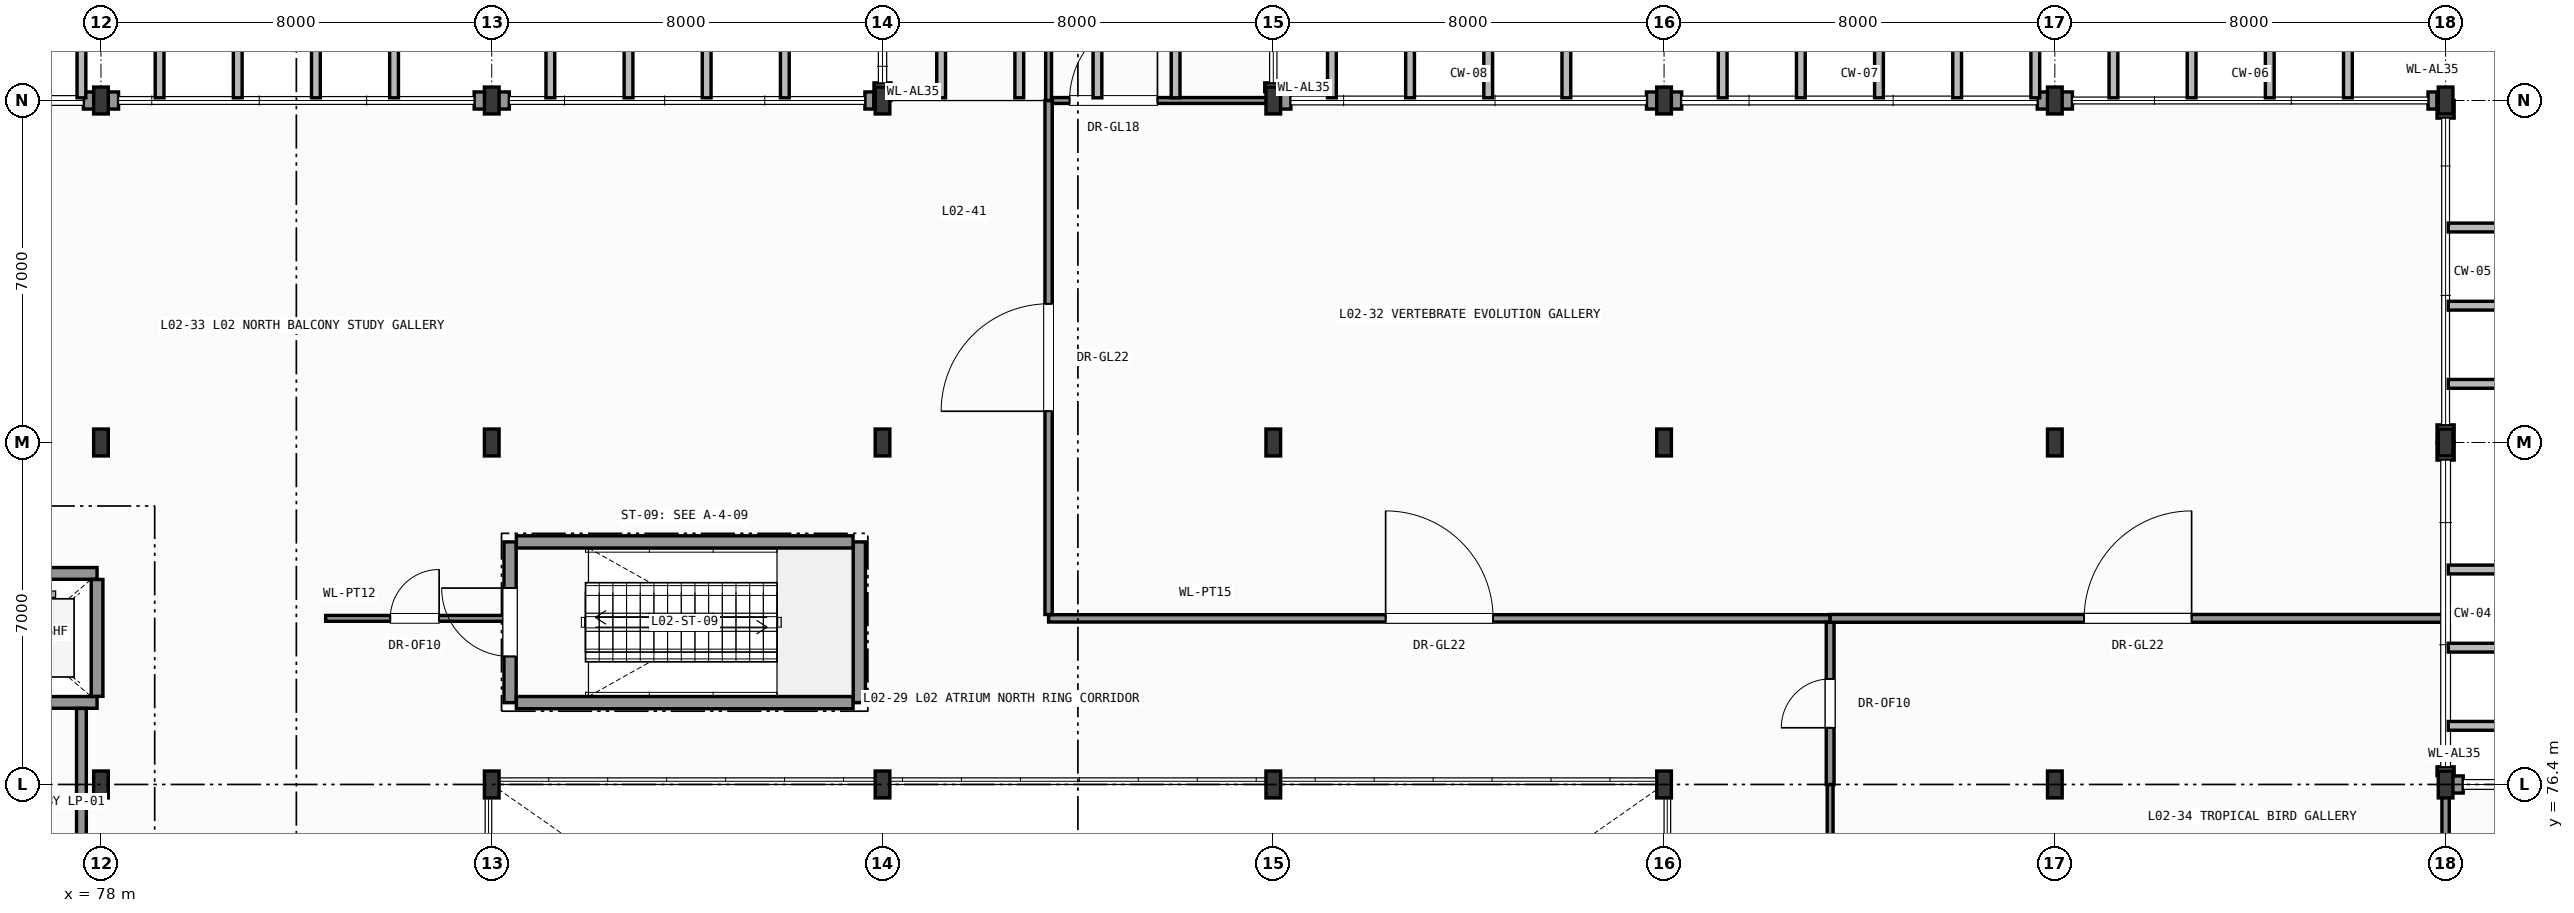
"""IFC4 building model, lengths in metres.
Left out: names, types, materials, properties, quantities, classifications, styles, units other than length and angle.
Written with IfcOpenShell. Run it as: python <this file> out.ifc"""

import sys

from ifc_helpers import new_model, si_unit, direction, frame, frame_2d, origin, origin_2d, place, context, subcontext, project, spatial, rectangle, i_section, extrude, element, fill, save


model = new_model("IFC4")
c1 = context("Model", 3, precision=1e-05, world=origin(), true_north=direction((0.0, 1.0)))
c2 = subcontext(c1, "Body", "Model", "MODEL_VIEW")
j1 = project(units=[si_unit("LENGTHUNIT", "METRE"), si_unit("PLANEANGLEUNIT", "RADIAN")], contexts=[c1])
p1 = place(None, origin())
s1 = spatial("IfcSite", under=j1, at=p1, CompositionType="ELEMENT")
p2 = place(p1, origin())
s2 = spatial("IfcBuilding", under=s1, at=p2, CompositionType="ELEMENT")
p3 = place(p2, frame((0.0, 0.0, 7.8)))
s3 = spatial("IfcBuildingStorey", under=s2, at=p3, CompositionType="ELEMENT", Elevation=7.8)
for number, where, z_axis, x_axis in (
    (1, (78.0, 76.4, 0.0), (0.0, 0.0, 1.0), (1.0, 0.0, 0.0)),
    (2, (78.0, 83.4, 0.0), (0.0, 0.0, 1.0), (1.0, 0.0, 0.0)),
    (3, (78.0, 90.4, 0.0), (0.0, 0.0, 1.0), (1.0, 0.0, 0.0)),
    (4, (86.0, 76.4, 0.0), (0.0, 0.0, 1.0), (1.0, 0.0, 0.0)),
    (5, (86.0, 83.4, 0.0), (0.0, 0.0, 1.0), (1.0, 0.0, 0.0)),
    (6, (86.0, 90.4, 0.0), (0.0, 0.0, 1.0), (1.0, 0.0, 0.0)),
    (7, (94.0, 76.4, 0.0), (0.0, 0.0, 1.0), (1.0, 0.0, 0.0)),
    (8, (94.0, 83.4, 0.0), (0.0, 0.0, 1.0), (1.0, 0.0, 0.0)),
    (9, (94.0, 90.4, 0.0), (0.0, 0.0, 1.0), (1.0, 0.0, 0.0)),
    (10, (102.0, 76.4, 0.0), (0.0, 0.0, 1.0), (1.0, 0.0, 0.0)),
    (11, (102.0, 83.4, 0.0), (0.0, 0.0, 1.0), (1.0, 0.0, 0.0)),
    (12, (102.0, 90.4, 0.0), (0.0, 0.0, 1.0), (1.0, 0.0, 0.0)),
    (13, (110.0, 76.4, 0.0), (0.0, 0.0, 1.0), (1.0, 0.0, 0.0)),
    (14, (110.0, 83.4, 0.0), (0.0, 0.0, 1.0), (1.0, 0.0, 0.0)),
    (15, (110.0, 90.4, 0.0), (0.0, 0.0, 1.0), (1.0, 0.0, 0.0)),
    (16, (118.0, 76.4, 0.0), (0.0, 0.0, 1.0), (1.0, 0.0, 0.0)),
    (17, (118.0, 83.4, 0.0), (0.0, 0.0, 1.0), (1.0, 0.0, 0.0)),
    (18, (118.0, 90.4, 0.0), (0.0, 0.0, 1.0), (1.0, 0.0, 0.0)),
    (19, (126.0, 76.4, 0.0), (0.0, 0.0, 1.0), (1.0, 0.0, 0.0)),
    (20, (126.0, 83.4, 0.0), (0.0, 0.0, 1.0), (1.0, 0.0, 0.0)),
    (21, (126.0, 90.4, 0.0), (0.0, 0.0, 1.0), (1.0, 0.0, 0.0)),
):
    element("IfcColumn", number, at=place(p3, frame(where, z_axis=z_axis, x_axis=x_axis)), inside=s3, PredefinedType="COLUMN", context=c2, shape_type="SweptSolid", body=[
        extrude(i_section(OverallWidth=0.3, OverallDepth=0.55, WebThickness=0.015, FlangeThickness=0.029, FilletRadius=0.027, at=origin_2d()), origin(), (0.0, 0.0, 1.0), 5.4),
    ])
p4 = place(p3, frame((126.36, 76.4, 0.0), z_axis=(0.0, 0.0, 1.0), x_axis=(-1.0, 0.0, 0.0)))
e22 = element("IfcWall", 22, at=p4, inside=s3, PredefinedType="SOLIDWALL", context=c2, shape_type="SweptSolid", body=[
    extrude(rectangle(XDim=0.36, YDim=0.35, at=frame_2d((0.18, 0.0))), origin(), (0.0, 0.0, 1.0), 4.745),
])
p5 = place(p3, frame((126.0, 76.579, 0.0), z_axis=(0.0, 0.0, 1.0), x_axis=(0.0, 1.0, 0.0)))
e23 = element("IfcWall", 23, at=p5, inside=s3, PredefinedType="SOLIDWALL", context=c2, shape_type="SweptSolid", body=[
    extrude(rectangle(XDim=0.181, YDim=0.35, at=frame_2d((0.09, 0.0))), origin(), (0.0, 0.0, 1.0), 5.15),
])
p6 = place(p3, frame((126.0, 83.04, 0.0), z_axis=(0.0, 0.0, 1.0), x_axis=(0.0, 1.0, 0.0)))
e24 = element("IfcWall", 24, at=p6, inside=s3, PredefinedType="SOLIDWALL", context=c2, shape_type="SweptSolid", body=[
    extrude(rectangle(XDim=0.36, YDim=0.35, at=frame_2d((0.18, 0.0))), origin(), (0.0, 0.0, 1.0), 4.845),
])
p7 = place(p3, frame((126.0, 83.4, 0.0), z_axis=(0.0, 0.0, 1.0), x_axis=(0.0, 1.0, 0.0)))
e25 = element("IfcWall", 25, at=p7, inside=s3, PredefinedType="SOLIDWALL", context=c2, shape_type="SweptSolid", body=[
    extrude(rectangle(XDim=0.36, YDim=0.35, at=frame_2d((0.18, 0.0))), origin(), (0.0, 0.0, 1.0), 4.845),
])
p8 = place(p3, frame((126.0, 90.04, 0.0), z_axis=(0.0, 0.0, 1.0), x_axis=(0.0, 1.0, 0.0)))
e26 = element("IfcWall", 26, at=p8, inside=s3, PredefinedType="SOLIDWALL", context=c2, shape_type="SweptSolid", body=[
    extrude(rectangle(XDim=0.36, YDim=0.35, at=frame_2d((0.18, 0.0))), origin(), (0.0, 0.0, 1.0), 4.845),
])
p9 = place(p3, frame((125.821, 90.4, 0.0), z_axis=(0.0, 0.0, 1.0), x_axis=(-1.0, 0.0, 0.0)))
e27 = element("IfcWall", 27, at=p9, inside=s3, PredefinedType="SOLIDWALL", context=c2, shape_type="SweptSolid", body=[
    extrude(rectangle(XDim=0.181, YDim=0.35, at=frame_2d((0.091, 0.0))), origin(), (0.0, 0.0, 1.0), 5.15),
])
for number, where, z_axis, x_axis in (
    (28, (118.36, 90.4, 0.0), (0.0, 0.0, 1.0), (-1.0, 0.0, 0.0)),
    (29, (118.0, 90.4, 0.0), (0.0, 0.0, 1.0), (-1.0, 0.0, 0.0)),
    (30, (110.36, 90.4, 0.0), (0.0, 0.0, 1.0), (-1.0, 0.0, 0.0)),
    (31, (110.0, 90.4, 0.0), (0.0, 0.0, 1.0), (-1.0, 0.0, 0.0)),
    (32, (102.36, 90.4, 0.0), (0.0, 0.0, 1.0), (-1.0, 0.0, 0.0)),
):
    element("IfcWall", number, at=place(p3, frame(where, z_axis=z_axis, x_axis=x_axis)), inside=s3, PredefinedType="SOLIDWALL", context=c2, shape_type="SweptSolid", body=[
        extrude(rectangle(XDim=0.36, YDim=0.35, at=frame_2d((0.18, 0.0))), origin(), (0.0, 0.0, 1.0), 4.745),
    ])
p10 = place(p3, frame((102.0, 90.579, 0.0), z_axis=(0.0, 0.0, 1.0), x_axis=(0.0, 1.0, 0.0)))
e33 = element("IfcWall", 33, at=p10, inside=s3, PredefinedType="SOLIDWALL", context=c2, shape_type="SweptSolid", body=[
    extrude(rectangle(XDim=0.181, YDim=0.35, at=frame_2d((0.09, 0.0))), origin(), (0.0, 0.0, 1.0), 5.15),
])
p11 = place(p3, frame((94.0, 90.76, 0.0), z_axis=(0.0, 0.0, 1.0), x_axis=(0.0, -1.0, 0.0)))
e34 = element("IfcWall", 34, at=p11, inside=s3, PredefinedType="SOLIDWALL", context=c2, shape_type="SweptSolid", body=[
    extrude(rectangle(XDim=0.36, YDim=0.35, at=frame_2d((0.18, 0.0))), origin(), (0.0, 0.0, 1.0), 4.635),
])
p12 = place(p3, frame((93.821, 90.4, 0.0), z_axis=(0.0, 0.0, 1.0), x_axis=(-1.0, 0.0, 0.0)))
e35 = element("IfcWall", 35, at=p12, inside=s3, PredefinedType="SOLIDWALL", context=c2, shape_type="SweptSolid", body=[
    extrude(rectangle(XDim=0.181, YDim=0.35, at=frame_2d((0.091, 0.0))), origin(), (0.0, 0.0, 1.0), 5.15),
])
for number, where, z_axis, x_axis in (
    (36, (86.36, 90.4, 0.0), (0.0, 0.0, 1.0), (-1.0, 0.0, 0.0)),
    (37, (86.0, 90.4, 0.0), (0.0, 0.0, 1.0), (-1.0, 0.0, 0.0)),
    (38, (78.36, 90.4, 0.0), (0.0, 0.0, 1.0), (-1.0, 0.0, 0.0)),
    (39, (78.0, 90.4, 0.0), (0.0, 0.0, 1.0), (-1.0, 0.0, 0.0)),
):
    element("IfcWall", number, at=place(p3, frame(where, z_axis=z_axis, x_axis=x_axis)), inside=s3, PredefinedType="SOLIDWALL", context=c2, shape_type="SweptSolid", body=[
        extrude(rectangle(XDim=0.36, YDim=0.35, at=frame_2d((0.18, 0.0))), origin(), (0.0, 0.0, 1.0), 4.745),
    ])
p13 = place(p3, frame((86.375, 78.075, 0.0), z_axis=(0.0, 0.0, 1.0), x_axis=(0.0, 1.0, 0.0)))
e40 = element("IfcWall", 40, at=p13, inside=s3, PredefinedType="SHEAR", context=c2, shape_type="SweptSolid", body=[
    extrude(rectangle(XDim=3.29, YDim=0.25, at=frame_2d((1.645, 0.0))), origin(), (0.0, 0.0, 1.0), 5.15),
])
p14 = place(p13, frame((0.945, 0.0, 0.0)))
e41 = element("IfcOpeningElement", 41, at=p14, cuts=e40, PredefinedType="OPENING", context=c2, shape_type="SweptSolid", body=[
    extrude(rectangle(XDim=1.4, YDim=2.2, at=frame_2d((0.7, 1.1))), frame((0.0, 0.135, 0.0), z_axis=(0.0, -1.0, 0.0), x_axis=(1.0, 0.0, 0.0)), (0.0, 0.0, 1.0), 0.27),
])
p15 = place(p3, frame((93.525, 78.075, 0.0), z_axis=(0.0, 0.0, 1.0), x_axis=(0.0, 1.0, 0.0)))
e42 = element("IfcWall", 42, at=p15, inside=s3, PredefinedType="SHEAR", context=c2, shape_type="SweptSolid", body=[
    extrude(rectangle(XDim=3.29, YDim=0.25, at=frame_2d((1.645, 0.0))), origin(), (0.0, 0.0, 1.0), 5.15),
])
for number, where, z_axis, x_axis in (
    (43, (86.504, 78.075, 0.0), (0.0, 0.0, 1.0), (1.0, 0.0, 0.0)),
    (44, (86.504, 81.365, 0.0), (0.0, 0.0, 1.0), (1.0, 0.0, 0.0)),
):
    element("IfcWall", number, at=place(p3, frame(where, z_axis=z_axis, x_axis=x_axis)), inside=s3, PredefinedType="SHEAR", context=c2, shape_type="SweptSolid", body=[
        extrude(rectangle(XDim=6.892, YDim=0.25, at=frame_2d((3.446, 0.0))), origin(), (0.0, 0.0, 1.0), 5.15),
    ])
p16 = place(p3, frame((74.88, 78.08, 0.0), z_axis=(0.0, 0.0, 1.0), x_axis=(1.0, 0.0, 0.0)))
e45 = element("IfcWall", 45, at=p16, inside=s3, PredefinedType="SHEAR", context=c2, shape_type="SweptSolid", body=[
    extrude(rectangle(XDim=3.04, YDim=0.24, at=frame_2d((1.52, 0.0))), origin(), (0.0, 0.0, 1.0), 5.15),
])
p17 = place(p16, frame((0.97, 0.0, 0.0)))
e46 = element("IfcOpeningElement", 46, at=p17, cuts=e45, PredefinedType="OPENING", context=c2, shape_type="SweptSolid", body=[
    extrude(rectangle(XDim=1.1, YDim=2.2, at=frame_2d((0.55, 1.1))), frame((0.0, 0.13, 0.0), z_axis=(0.0, -1.0, 0.0), x_axis=(1.0, 0.0, 0.0)), (0.0, 0.0, 1.0), 0.26),
])
p18 = place(p3, frame((74.88, 80.72, 0.0), z_axis=(0.0, 0.0, 1.0), x_axis=(1.0, 0.0, 0.0)))
e47 = element("IfcWall", 47, at=p18, inside=s3, PredefinedType="SHEAR", context=c2, shape_type="SweptSolid", body=[
    extrude(rectangle(XDim=3.04, YDim=0.24, at=frame_2d((1.52, 0.0))), origin(), (0.0, 0.0, 1.0), 5.15),
])
p19 = place(p3, frame((77.92, 78.204, 0.0), z_axis=(0.0, 0.0, 1.0), x_axis=(0.0, 1.0, 0.0)))
e48 = element("IfcWall", 48, at=p19, inside=s3, PredefinedType="SHEAR", context=c2, shape_type="SweptSolid", body=[
    extrude(rectangle(XDim=2.392, YDim=0.24, at=frame_2d((1.196, 0.0))), origin(), (0.0, 0.0, 1.0), 5.15),
])
p20 = place(p3, frame((77.6, 74.304, 0.0), z_axis=(0.0, 0.0, 1.0), x_axis=(0.0, 1.0, 0.0)))
e49 = element("IfcWall", 49, at=p20, inside=s3, PredefinedType="PARTITIONING", context=c2, shape_type="SweptSolid", body=[
    extrude(rectangle(XDim=3.652, YDim=0.2, at=frame_2d((1.826, 0.0))), origin(), (0.0, 0.0, 1.0), 5.15),
])
p21 = place(p3, frame((113.4, 71.6, 0.0), z_axis=(0.0, 0.0, 1.0), x_axis=(0.0, 1.0, 0.0)))
e50 = element("IfcWall", 50, at=p21, inside=s3, PredefinedType="PARTITIONING", context=c2, shape_type="SweptSolid", body=[
    extrude(rectangle(XDim=4.8, YDim=0.12, at=frame_2d((2.4, 0.0))), origin(), (0.0, 0.0, 1.0), 5.15),
])
p22 = place(p21, frame((1.5, 0.0, 0.0)))
e51 = element("IfcOpeningElement", 51, at=p22, cuts=e50, PredefinedType="OPENING", context=c2, shape_type="SweptSolid", body=[
    extrude(rectangle(XDim=1.8, YDim=2.4, at=frame_2d((0.9, 1.2))), frame((0.0, 0.07, 0.0), z_axis=(0.0, -1.0, 0.0), x_axis=(1.0, 0.0, 0.0)), (0.0, 0.0, 1.0), 0.14),
])
p23 = place(p3, frame((97.4, 79.8, 0.0), z_axis=(0.0, 0.0, 1.0), x_axis=(1.0, 0.0, 0.0)))
e52 = element("IfcWall", 52, at=p23, inside=s3, PredefinedType="PARTITIONING", context=c2, shape_type="SweptSolid", body=[
    extrude(rectangle(XDim=16.0, YDim=0.15, at=frame_2d((8.0, 0.0))), origin(), (0.0, 0.0, 1.0), 4.775),
])
p24 = place(p23, frame((6.9, 0.0, 0.0)))
e53 = element("IfcOpeningElement", 53, at=p24, cuts=e52, PredefinedType="OPENING", context=c2, shape_type="SweptSolid", body=[
    extrude(rectangle(XDim=2.2, YDim=2.6, at=frame_2d((1.1, 1.3))), frame((0.0, 0.085, 0.0), z_axis=(0.0, -1.0, 0.0), x_axis=(1.0, 0.0, 0.0)), (0.0, 0.0, 1.0), 0.17),
])
p25 = place(p3, frame((82.6, 79.8, 0.0), z_axis=(0.0, 0.0, 1.0), x_axis=(1.0, 0.0, 0.0)))
e54 = element("IfcWall", 54, at=p25, inside=s3, PredefinedType="PARTITIONING", context=c2, shape_type="SweptSolid", body=[
    extrude(rectangle(XDim=3.646, YDim=0.12, at=frame_2d((1.823, 0.0))), origin(), (0.0, 0.0, 1.0), 4.805),
])
p26 = place(p25, frame((1.323, 0.0, 0.0)))
e55 = element("IfcOpeningElement", 55, at=p26, cuts=e54, PredefinedType="OPENING", context=c2, shape_type="SweptSolid", body=[
    extrude(rectangle(XDim=1.0, YDim=2.15, at=frame_2d((0.5, 1.075))), frame((0.0, 0.07, 0.0), z_axis=(0.0, -1.0, 0.0), x_axis=(1.0, 0.0, 0.0)), (0.0, 0.0, 1.0), 0.14),
])
p27 = place(p3, frame((113.4, 76.4, 0.0), z_axis=(0.0, 0.0, 1.0), x_axis=(0.0, 1.0, 0.0)))
e56 = element("IfcWall", 56, at=p27, inside=s3, PredefinedType="PARTITIONING", context=c2, shape_type="SweptSolid", body=[
    extrude(rectangle(XDim=3.321, YDim=0.16, at=frame_2d((1.661, 0.0))), origin(), (0.0, 0.0, 1.0), 5.15),
])
p28 = place(p27, frame((1.16, 0.0, 0.0)))
e57 = element("IfcOpeningElement", 57, at=p28, cuts=e56, PredefinedType="OPENING", context=c2, shape_type="SweptSolid", body=[
    extrude(rectangle(XDim=1.0, YDim=2.15, at=frame_2d((0.5, 1.075))), frame((0.0, 0.09, 0.0), z_axis=(0.0, -1.0, 0.0), x_axis=(1.0, 0.0, 0.0)), (0.0, 0.0, 1.0), 0.18),
])
p29 = place(p3, frame((113.4, 79.8, 0.0), z_axis=(0.0, 0.0, 1.0), x_axis=(1.0, 0.0, 0.0)))
e58 = element("IfcWall", 58, at=p29, inside=s3, PredefinedType="PARTITIONING", context=c2, shape_type="SweptSolid", body=[
    extrude(rectangle(XDim=12.6, YDim=0.16, at=frame_2d((6.3, 0.0))), origin(), (0.0, 0.0, 1.0), 4.775),
])
p30 = place(p29, frame((5.2, 0.0, 0.0)))
e59 = element("IfcOpeningElement", 59, at=p30, cuts=e58, PredefinedType="OPENING", context=c2, shape_type="SweptSolid", body=[
    extrude(rectangle(XDim=2.2, YDim=2.6, at=frame_2d((1.1, 1.3))), frame((0.0, 0.09, 0.0), z_axis=(0.0, -1.0, 0.0), x_axis=(1.0, 0.0, 0.0)), (0.0, 0.0, 1.0), 0.18),
])
p31 = place(p3, frame((97.4, 79.879, 0.0), z_axis=(0.0, 0.0, 1.0), x_axis=(0.0, 1.0, 0.0)))
e60 = element("IfcWall", 60, at=p31, inside=s3, PredefinedType="PARTITIONING", context=c2, shape_type="SweptSolid", body=[
    extrude(rectangle(XDim=10.521, YDim=0.15, at=frame_2d((5.26, 0.0))), origin(), (0.0, 0.0, 1.0), 5.15),
])
p32 = place(p31, frame((4.16, 0.0, 0.0)))
e61 = element("IfcOpeningElement", 61, at=p32, cuts=e60, PredefinedType="OPENING", context=c2, shape_type="SweptSolid", body=[
    extrude(rectangle(XDim=2.2, YDim=2.6, at=frame_2d((1.1, 1.3))), frame((0.0, 0.085, 0.0), z_axis=(0.0, -1.0, 0.0), x_axis=(1.0, 0.0, 0.0)), (0.0, 0.0, 1.0), 0.17),
])
p33 = place(p3, frame((97.479, 90.4, 0.0), z_axis=(0.0, 0.0, 1.0), x_axis=(1.0, 0.0, 0.0)))
e62 = element("IfcWall", 62, at=p33, inside=s3, PredefinedType="PARTITIONING", context=c2, shape_type="SweptSolid", body=[
    extrude(rectangle(XDim=4.521, YDim=0.12, at=frame_2d((2.26, 0.0))), origin(), (0.0, 0.0, 1.0), 4.745),
])
p34 = place(p33, frame((0.35, 0.0, 0.0)))
e63 = element("IfcOpeningElement", 63, at=p34, cuts=e62, PredefinedType="OPENING", context=c2, shape_type="SweptSolid", body=[
    extrude(rectangle(XDim=1.8, YDim=2.4, at=frame_2d((0.9, 1.2))), frame((0.0, 0.07, 0.0), z_axis=(0.0, -1.0, 0.0), x_axis=(1.0, 0.0, 0.0)), (0.0, 0.0, 1.0), 0.14),
])
p35 = place(p3, frame((126.0, 71.684, 0.0), z_axis=(0.0, 0.0, 1.0), x_axis=(0.0, 1.0, 0.0)))
e64 = element("IfcWall", 64, at=p35, inside=s3, PredefinedType="PARTITIONING", context=c2, shape_type="SweptSolid", body=[
    extrude(rectangle(XDim=4.537, YDim=0.15, at=frame_2d((2.269, 0.0))), origin(), (0.0, 0.0, 1.0), 4.695),
])
p36 = place(p35, frame((1.368, 0.0, 0.0)))
e65 = element("IfcOpeningElement", 65, at=p36, cuts=e64, PredefinedType="OPENING", context=c2, shape_type="SweptSolid", body=[
    extrude(rectangle(XDim=1.8, YDim=2.4, at=frame_2d((0.9, 1.2))), frame((0.0, 0.085, 0.0), z_axis=(0.0, -1.0, 0.0), x_axis=(1.0, 0.0, 0.0)), (0.0, 0.0, 1.0), 0.17),
])
p37 = place(p3, frame((97.4, 90.4, 0.0), z_axis=(0.0, 0.0, 1.0), x_axis=(0.0, 1.0, 0.0)))
e66 = element("IfcWall", 66, at=p37, inside=s3, PredefinedType="PARTITIONING", context=c2, shape_type="SweptSolid", body=[
    extrude(rectangle(XDim=30.4, YDim=0.12, at=frame_2d((15.2, 0.0))), origin(), (0.0, 0.0, 1.0), 5.15),
])
p38 = place(p37, frame((14.1, 0.0, 0.0)))
e67 = element("IfcOpeningElement", 67, at=p38, cuts=e66, PredefinedType="OPENING", context=c2, shape_type="SweptSolid", body=[
    extrude(rectangle(XDim=2.2, YDim=2.6, at=frame_2d((1.1, 1.3))), frame((0.0, 0.07, 0.0), z_axis=(0.0, -1.0, 0.0), x_axis=(1.0, 0.0, 0.0)), (0.0, 0.0, 1.0), 0.14),
])
p39 = place(p14, origin())
e68 = element("IfcDoor", 68, at=p39, inside=s3, OperationType="SINGLE_SWING_RIGHT", PredefinedType="DOOR", context=c2, shape_type="SweptSolid", body=[
    extrude(rectangle(XDim=1.4, YDim=2.2, at=frame_2d((0.7, 1.1))), frame((0.0, 0.025, 0.0), z_axis=(0.0, -1.0, 0.0), x_axis=(1.0, 0.0, 0.0)), (0.0, 0.0, 1.0), 0.05),
])
fill(e41, e68)
p40 = place(p24, origin())
e69 = element("IfcDoor", 69, at=p40, inside=s3, OperationType="SINGLE_SWING_LEFT", PredefinedType="DOOR", context=c2, shape_type="SweptSolid", body=[
    extrude(rectangle(XDim=2.2, YDim=2.6, at=frame_2d((1.1, 1.3))), frame((0.0, 0.025, 0.0), z_axis=(0.0, -1.0, 0.0), x_axis=(1.0, 0.0, 0.0)), (0.0, 0.0, 1.0), 0.05),
])
fill(e53, e69)
p41 = place(p26, origin())
e70 = element("IfcDoor", 70, at=p41, inside=s3, OperationType="SINGLE_SWING_RIGHT", PredefinedType="DOOR", context=c2, shape_type="SweptSolid", body=[
    extrude(rectangle(XDim=1.0, YDim=2.15, at=frame_2d((0.5, 1.075))), frame((0.0, 0.025, 0.0), z_axis=(0.0, -1.0, 0.0), x_axis=(1.0, 0.0, 0.0)), (0.0, 0.0, 1.0), 0.05),
])
fill(e55, e70)
p42 = place(p28, origin())
e71 = element("IfcDoor", 71, at=p42, inside=s3, OperationType="SINGLE_SWING_LEFT", PredefinedType="DOOR", context=c2, shape_type="SweptSolid", body=[
    extrude(rectangle(XDim=1.0, YDim=2.15, at=frame_2d((0.5, 1.075))), frame((0.0, 0.025, 0.0), z_axis=(0.0, -1.0, 0.0), x_axis=(1.0, 0.0, 0.0)), (0.0, 0.0, 1.0), 0.05),
])
fill(e57, e71)
p43 = place(p30, origin())
e72 = element("IfcDoor", 72, at=p43, inside=s3, OperationType="SINGLE_SWING_RIGHT", PredefinedType="DOOR", context=c2, shape_type="SweptSolid", body=[
    extrude(rectangle(XDim=2.2, YDim=2.6, at=frame_2d((1.1, 1.3))), frame((0.0, 0.025, 0.0), z_axis=(0.0, -1.0, 0.0), x_axis=(1.0, 0.0, 0.0)), (0.0, 0.0, 1.0), 0.05),
])
fill(e59, e72)
p44 = place(p32, origin())
e73 = element("IfcDoor", 73, at=p44, inside=s3, OperationType="SINGLE_SWING_LEFT", PredefinedType="DOOR", context=c2, shape_type="SweptSolid", body=[
    extrude(rectangle(XDim=2.2, YDim=2.6, at=frame_2d((1.1, 1.3))), frame((0.0, 0.025, 0.0), z_axis=(0.0, -1.0, 0.0), x_axis=(1.0, 0.0, 0.0)), (0.0, 0.0, 1.0), 0.05),
])
fill(e61, e73)
p45 = place(p34, origin())
e74 = element("IfcDoor", 74, at=p45, inside=s3, OperationType="SINGLE_SWING_RIGHT", PredefinedType="DOOR", context=c2, shape_type="SweptSolid", body=[
    extrude(rectangle(XDim=1.8, YDim=2.4, at=frame_2d((0.9, 1.2))), frame((0.0, 0.025, 0.0), z_axis=(0.0, -1.0, 0.0), x_axis=(1.0, 0.0, 0.0)), (0.0, 0.0, 1.0), 0.05),
])
fill(e63, e74)
save(model, sys.argv[1])
